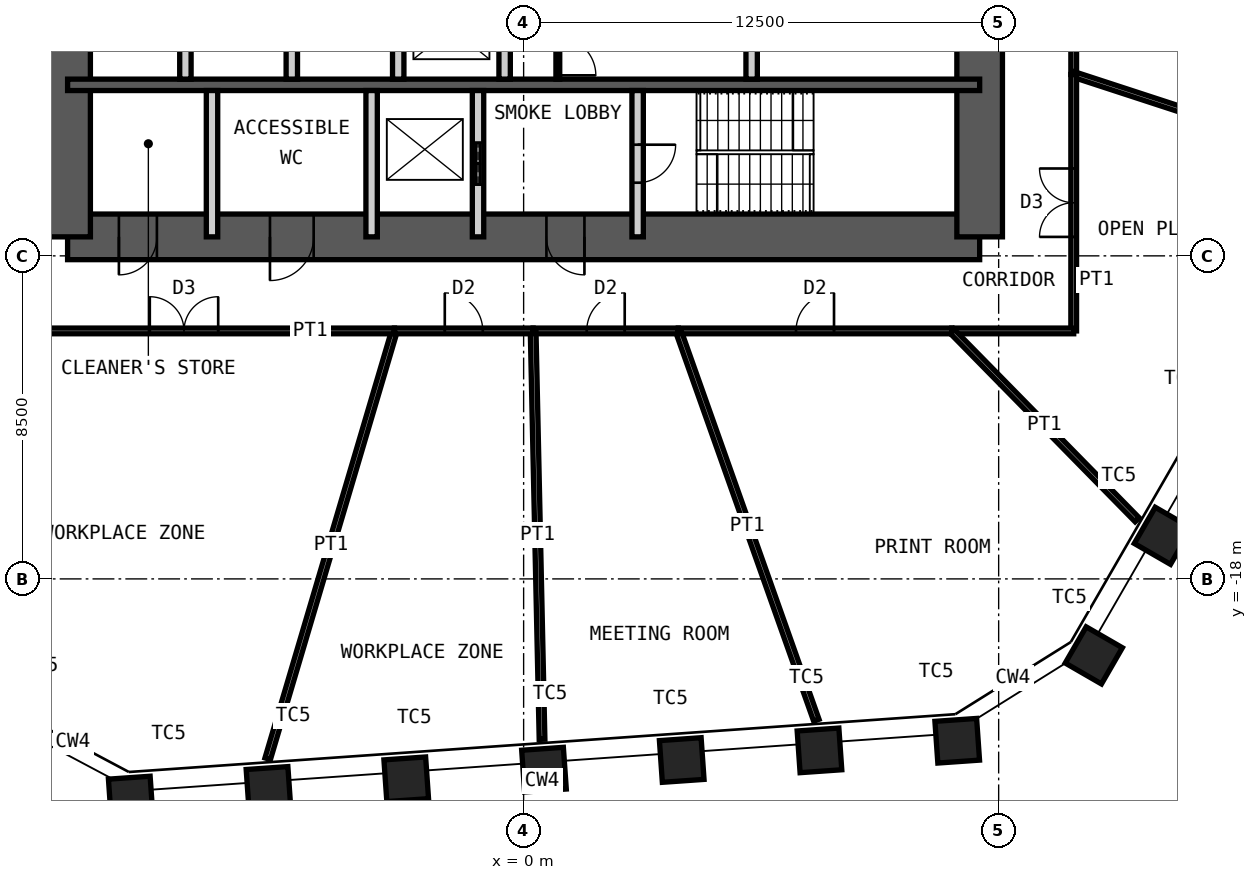
"""IFC4 building model, lengths in metres.
Left out: names, types, materials, properties, quantities, classifications, styles, units other than length and angle.
Written with IfcOpenShell. Run it as: python <this file> out.ifc"""

import sys

from ifc_helpers import new_model, si_unit, direction, frame, frame_2d, origin, origin_2d, place, context, subcontext, project, spatial, rectangle, hollow_rectangle, extrude, element, fill, save


model = new_model("IFC4")
c1 = context("Model", 3, precision=1e-05, world=origin(), true_north=direction((0.0, 1.0)))
c2 = subcontext(c1, "Body", "Model", "MODEL_VIEW")
j1 = project(units=[si_unit("LENGTHUNIT", "METRE"), si_unit("PLANEANGLEUNIT", "RADIAN")], contexts=[c1])
p1 = place(None, origin())
s1 = spatial("IfcSite", under=j1, at=p1, CompositionType="ELEMENT")
p2 = place(p1, origin())
s2 = spatial("IfcBuilding", under=s1, at=p2, CompositionType="ELEMENT")
p3 = place(p2, frame((0.0, 0.0, 209.8)))
s3 = spatial("IfcBuildingStorey", under=s2, at=p3, CompositionType="ELEMENT", Elevation=209.8)
for number, where, z_axis, x_axis in (
    (1, (16.821, -16.866, 0.0), (0.0, 0.0, 1.0), (0.5, 0.866, 0.0)),
    (2, (15.004, -20.012, 0.0), (0.0, 0.0, 1.0), (0.5, 0.866, 0.0)),
    (3, (11.41, -22.258, 0.0), (0.0, 0.0, 1.0), (0.998, 0.07, 0.0)),
    (4, (7.785, -22.512, 0.0), (0.0, 0.0, 1.0), (0.998, 0.07, 0.0)),
    (5, (4.16, -22.765, 0.0), (0.0, 0.0, 1.0), (0.998, 0.07, 0.0)),
    (6, (0.536, -23.019, 0.0), (0.0, 0.0, 1.0), (0.998, 0.07, 0.0)),
    (7, (-3.089, -23.272, 0.0), (0.0, 0.0, 1.0), (0.998, 0.07, 0.0)),
    (8, (-6.714, -23.526, 0.0), (0.0, 0.0, 1.0), (0.998, 0.07, 0.0)),
    (9, (-10.338, -23.779, 0.0), (0.0, 0.0, 1.0), (0.998, 0.07, 0.0)),
):
    element("IfcColumn", number, at=place(p3, frame(where, z_axis=z_axis, x_axis=x_axis)), inside=s3, PredefinedType="COLUMN", context=c2, shape_type="SweptSolid", body=[
        extrude(hollow_rectangle(XDim=1.1, YDim=1.1, WallThickness=0.07, at=origin_2d()), origin(), (0.0, 0.0, 1.0), 4.2),
    ])
p4 = place(p3, frame((-12.0, -9.0, 0.0), z_axis=(0.0, 0.0, 1.0), x_axis=(1.0, 0.0, 0.0)))
e10 = element("IfcWall", 10, at=p4, inside=s3, PredefinedType="SHEAR", context=c2, shape_type="SweptSolid", body=[
    extrude(rectangle(XDim=24.0, YDim=1.2, at=frame_2d((12.0, 0.0))), origin(), (0.0, 0.0, 1.0), 4.2),
])
p5 = place(p4, frame((1.35, 0.0, 0.0)))
e11 = element("IfcOpeningElement", 11, at=p5, cuts=e10, PredefinedType="OPENING", context=c2, shape_type="SweptSolid", body=[
    extrude(rectangle(XDim=1.0, YDim=2.1, at=frame_2d((0.5, 1.05))), frame((0.0, 0.61, 0.0), z_axis=(0.0, -1.0, 0.0), x_axis=(1.0, 0.0, 0.0)), (0.0, 0.0, 1.0), 1.22),
])
p6 = place(p4, frame((5.325, 0.0, 0.0)))
e12 = element("IfcOpeningElement", 12, at=p6, cuts=e10, PredefinedType="OPENING", context=c2, shape_type="SweptSolid", body=[
    extrude(rectangle(XDim=1.15, YDim=2.1, at=frame_2d((0.575, 1.05))), frame((0.0, 0.61, 0.0), z_axis=(0.0, -1.0, 0.0), x_axis=(1.0, 0.0, 0.0)), (0.0, 0.0, 1.0), 1.22),
])
p7 = place(p4, frame((12.6, 0.0, 0.0)))
e13 = element("IfcOpeningElement", 13, at=p7, cuts=e10, PredefinedType="OPENING", context=c2, shape_type="SweptSolid", body=[
    extrude(rectangle(XDim=1.0, YDim=2.1, at=frame_2d((0.5, 1.05))), frame((0.0, 0.61, 0.0), z_axis=(0.0, -1.0, 0.0), x_axis=(1.0, 0.0, 0.0)), (0.0, 0.0, 1.0), 1.22),
])
p8 = place(p3, frame((12.0, -9.0, 0.0), z_axis=(0.0, 0.0, 1.0), x_axis=(0.0, 1.0, 0.0)))
e14 = element("IfcWall", 14, at=p8, inside=s3, PredefinedType="SHEAR", context=c2, shape_type="SweptSolid", body=[
    extrude(rectangle(XDim=18.0, YDim=1.2, at=frame_2d((9.0, 0.0))), origin(), (0.0, 0.0, 1.0), 4.2),
])
p9 = place(p8, frame((8.1, 0.0, 0.0)))
e15 = element("IfcOpeningElement", 15, at=p9, cuts=e14, PredefinedType="OPENING", context=c2, shape_type="SweptSolid", body=[
    extrude(rectangle(XDim=1.8, YDim=2.1, at=frame_2d((0.9, 1.05))), frame((0.0, 0.61, 0.0), z_axis=(0.0, -1.0, 0.0), x_axis=(1.0, 0.0, 0.0)), (0.0, 0.0, 1.0), 1.22),
])
p10 = place(p3, frame((-12.0, -9.0, 0.0), z_axis=(0.0, 0.0, 1.0), x_axis=(0.0, 1.0, 0.0)))
e16 = element("IfcWall", 16, at=p10, inside=s3, PredefinedType="SHEAR", context=c2, shape_type="SweptSolid", body=[
    extrude(rectangle(XDim=18.0, YDim=1.2, at=frame_2d((9.0, 0.0))), origin(), (0.0, 0.0, 1.0), 4.2),
])
p11 = place(p10, frame((8.1, 0.0, 0.0)))
e17 = element("IfcOpeningElement", 17, at=p11, cuts=e16, PredefinedType="OPENING", context=c2, shape_type="SweptSolid", body=[
    extrude(rectangle(XDim=1.8, YDim=2.1, at=frame_2d((0.9, 1.05))), frame((0.0, 0.61, 0.0), z_axis=(0.0, -1.0, 0.0), x_axis=(1.0, 0.0, 0.0)), (0.0, 0.0, 1.0), 1.22),
])
p12 = place(p3, frame((-12.0, -5.0, 0.0), z_axis=(0.0, 0.0, 1.0), x_axis=(1.0, 0.0, 0.0)))
e18 = element("IfcWall", 18, at=p12, inside=s3, PredefinedType="SHEAR", context=c2, shape_type="SweptSolid", body=[
    extrude(rectangle(XDim=24.0, YDim=0.3, at=frame_2d((12.0, 0.0))), origin(), (0.0, 0.0, 1.0), 4.2),
])
for number, where, z_axis, x_axis in (
    (19, (-8.9, -4.85, 0.0), (0.0, 0.0, 1.0), (0.0, 1.0, 0.0)),
    (20, (-6.1, -4.85, 0.0), (0.0, 0.0, 1.0), (0.0, 1.0, 0.0)),
    (21, (-3.3, -4.85, 0.0), (0.0, 0.0, 1.0), (0.0, 1.0, 0.0)),
    (22, (-0.5, -4.85, 0.0), (0.0, 0.0, 1.0), (0.0, 1.0, 0.0)),
    (23, (6.0, -4.85, 0.0), (0.0, 0.0, 1.0), (0.0, 1.0, 0.0)),
):
    element("IfcWall", number, at=place(p3, frame(where, z_axis=z_axis, x_axis=x_axis)), inside=s3, PredefinedType="PARTITIONING", context=c2, shape_type="SweptSolid", body=[
        extrude(rectangle(XDim=2.65, YDim=0.3, at=frame_2d((1.325, 0.0))), origin(), (0.0, 0.0, 1.0), 3.98),
    ])
for number, where, z_axis, x_axis in (
    (24, (-8.2, -9.0, 0.0), (0.0, 0.0, 1.0), (0.0, 1.0, 0.0)),
    (25, (-4.0, -9.0, 0.0), (0.0, 0.0, 1.0), (0.0, 1.0, 0.0)),
):
    element("IfcWall", number, at=place(p3, frame(where, z_axis=z_axis, x_axis=x_axis)), inside=s3, PredefinedType="PARTITIONING", context=c2, shape_type="SweptSolid", body=[
        extrude(rectangle(XDim=3.85, YDim=0.3, at=frame_2d((1.925, 0.0))), origin(), (0.0, 0.0, 1.0), 3.98),
    ])
p13 = place(p3, frame((-1.2, -9.0, 0.0), z_axis=(0.0, 0.0, 1.0), x_axis=(0.0, 1.0, 0.0)))
e26 = element("IfcWall", 26, at=p13, inside=s3, PredefinedType="PARTITIONING", context=c2, shape_type="SweptSolid", body=[
    extrude(rectangle(XDim=3.85, YDim=0.3, at=frame_2d((1.925, 0.0))), origin(), (0.0, 0.0, 1.0), 3.98),
])
p14 = place(p13, frame((1.375, 0.0, 0.0)))
e27 = element("IfcOpeningElement", 27, at=p14, cuts=e26, PredefinedType="OPENING", context=c2, shape_type="SweptSolid", body=[
    extrude(rectangle(XDim=1.1, YDim=2.4, at=frame_2d((0.55, 1.2))), frame((0.0, 0.16, 0.0), z_axis=(0.0, -1.0, 0.0), x_axis=(1.0, 0.0, 0.0)), (0.0, 0.0, 1.0), 0.32),
])
p15 = place(p3, frame((3.0, -9.0, 0.0), z_axis=(0.0, 0.0, 1.0), x_axis=(0.0, 1.0, 0.0)))
e28 = element("IfcWall", 28, at=p15, inside=s3, PredefinedType="PARTITIONING", context=c2, shape_type="SweptSolid", body=[
    extrude(rectangle(XDim=3.85, YDim=0.3, at=frame_2d((1.925, 0.0))), origin(), (0.0, 0.0, 1.0), 3.98),
])
p16 = place(p15, frame((1.425, 0.0, 0.0)))
e29 = element("IfcOpeningElement", 29, at=p16, cuts=e28, PredefinedType="OPENING", context=c2, shape_type="SweptSolid", body=[
    extrude(rectangle(XDim=1.0, YDim=2.1, at=frame_2d((0.5, 1.05))), frame((0.0, 0.16, 0.0), z_axis=(0.0, -1.0, 0.0), x_axis=(1.0, 0.0, 0.0)), (0.0, 0.0, 1.0), 0.32),
])
p17 = place(p3, frame((0.9, -4.85, 0.0), z_axis=(0.0, 0.0, 1.0), x_axis=(0.0, 1.0, 0.0)))
e30 = element("IfcWall", 30, at=p17, inside=s3, PredefinedType="PARTITIONING", context=c2, shape_type="SweptSolid", body=[
    extrude(rectangle(XDim=2.65, YDim=0.1, at=frame_2d((1.325, 0.0))), origin(), (0.0, 0.0, 1.0), 3.98),
])
p18 = place(p17, frame((0.1, 0.0, 0.0)))
e31 = element("IfcOpeningElement", 31, at=p18, cuts=e30, PredefinedType="OPENING", context=c2, shape_type="SweptSolid", body=[
    extrude(rectangle(XDim=1.0, YDim=2.4, at=frame_2d((0.5, 1.2))), frame((0.0, 0.06, 0.0), z_axis=(0.0, -1.0, 0.0), x_axis=(1.0, 0.0, 0.0)), (0.0, 0.0, 1.0), 0.12),
])
p19 = place(p3, frame((-6.734, -22.731, 0.0), z_axis=(0.0, 0.0, 1.0), x_axis=(0.284049386564, 0.958809650553, 0.0)))
e32 = element("IfcWall", 32, at=p19, inside=s3, PredefinedType="PARTITIONING", context=c2, shape_type="SweptSolid", body=[
    extrude(rectangle(XDim=11.74, YDim=0.15, at=frame_2d((5.87, 0.0))), origin(), (0.0, 0.0, 1.0), 3.33),
])
p20 = place(p3, frame((-3.399, -11.475, 0.0), z_axis=(0.0, 0.0, 1.0), x_axis=(-1.0, 0.0, 0.0)))
e33 = element("IfcWall", 33, at=p20, inside=s3, PredefinedType="PARTITIONING", context=c2, shape_type="SweptSolid", body=[
    extrude(rectangle(XDim=11.076, YDim=0.15, at=frame_2d((5.538, 0.0))), origin(), (0.0, 0.0, 1.0), 4.03),
])
p21 = place(p20, frame((4.638, 0.0, 0.0)))
e34 = element("IfcOpeningElement", 34, at=p21, cuts=e33, PredefinedType="OPENING", context=c2, shape_type="SweptSolid", body=[
    extrude(rectangle(XDim=1.8, YDim=2.4, at=frame_2d((0.9, 1.2))), frame((0.0, 0.085, 0.0), z_axis=(0.0, -1.0, 0.0), x_axis=(1.0, 0.0, 0.0)), (0.0, 0.0, 1.0), 0.17),
])
p22 = place(p3, frame((14.475, -2.422, 0.0), z_axis=(0.0, 0.0, 1.0), x_axis=(0.0, -1.0, 0.0)))
e35 = element("IfcWall", 35, at=p22, inside=s3, PredefinedType="PARTITIONING", context=c2, shape_type="SweptSolid", body=[
    extrude(rectangle(XDim=2.305, YDim=0.15, at=frame_2d((1.153, 0.0))), origin(), (0.0, 0.0, 1.0), 4.03),
])
p23 = place(p22, frame((0.653, 0.0, 0.0)))
e36 = element("IfcOpeningElement", 36, at=p23, cuts=e35, PredefinedType="OPENING", context=c2, shape_type="SweptSolid", body=[
    extrude(rectangle(XDim=1.0, YDim=2.4, at=frame_2d((0.5, 1.2))), frame((0.0, 0.085, 0.0), z_axis=(0.0, -1.0, 0.0), x_axis=(1.0, 0.0, 0.0)), (0.0, 0.0, 1.0), 0.17),
])
p24 = place(p3, frame((21.57, -7.044, 0.0), z_axis=(0.0, 0.0, 1.0), x_axis=(-0.950585953502, 0.310461503258, 0.0)))
e37 = element("IfcWall", 37, at=p24, inside=s3, PredefinedType="PARTITIONING", context=c2, shape_type="SweptSolid", body=[
    extrude(rectangle(XDim=7.464, YDim=0.15, at=frame_2d((3.732, 0.0))), origin(), (0.0, 0.0, 1.0), 3.43),
])
p25 = place(p3, frame((14.475, -4.727, 0.0), z_axis=(0.0, 0.0, 1.0), x_axis=(0.0, -1.0, 0.0)))
e38 = element("IfcWall", 38, at=p25, inside=s3, PredefinedType="PARTITIONING", context=c2, shape_type="SweptSolid", body=[
    extrude(rectangle(XDim=6.748, YDim=0.15, at=frame_2d((3.374, 0.0))), origin(), (0.0, 0.0, 1.0), 4.03),
])
p26 = place(p25, frame((2.474, 0.0, 0.0)))
e39 = element("IfcOpeningElement", 39, at=p26, cuts=e38, PredefinedType="OPENING", context=c2, shape_type="SweptSolid", body=[
    extrude(rectangle(XDim=1.8, YDim=2.4, at=frame_2d((0.9, 1.2))), frame((0.0, 0.085, 0.0), z_axis=(0.0, -1.0, 0.0), x_axis=(1.0, 0.0, 0.0)), (0.0, 0.0, 1.0), 0.17),
])
p27 = place(p3, frame((14.475, -11.475, 0.0), z_axis=(0.0, 0.0, 1.0), x_axis=(-1.0, 0.0, 0.0)))
e40 = element("IfcWall", 40, at=p27, inside=s3, PredefinedType="PARTITIONING", context=c2, shape_type="SweptSolid", body=[
    extrude(rectangle(XDim=3.209, YDim=0.15, at=frame_2d((1.605, 0.0))), origin(), (0.0, 0.0, 1.0), 4.03),
])
p28 = place(p3, frame((16.145, -16.444, 0.0), z_axis=(0.0, 0.0, 1.0), x_axis=(-0.700591378209, 0.71356269576, 0.0)))
e41 = element("IfcWall", 41, at=p28, inside=s3, PredefinedType="PARTITIONING", context=c2, shape_type="SweptSolid", body=[
    extrude(rectangle(XDim=6.964, YDim=0.15, at=frame_2d((3.482, 0.0))), origin(), (0.0, 0.0, 1.0), 3.43),
])
p29 = place(p3, frame((11.266, -11.475, 0.0), z_axis=(0.0, 0.0, 1.0), x_axis=(-1.0, 0.0, 0.0)))
e42 = element("IfcWall", 42, at=p29, inside=s3, PredefinedType="PARTITIONING", context=c2, shape_type="SweptSolid", body=[
    extrude(rectangle(XDim=7.196, YDim=0.15, at=frame_2d((3.598, 0.0))), origin(), (0.0, 0.0, 1.0), 4.03),
])
p30 = place(p29, frame((3.098, 0.0, 0.0)))
e43 = element("IfcOpeningElement", 43, at=p30, cuts=e42, PredefinedType="OPENING", context=c2, shape_type="SweptSolid", body=[
    extrude(rectangle(XDim=1.0, YDim=2.4, at=frame_2d((0.5, 1.2))), frame((0.0, 0.085, 0.0), z_axis=(0.0, -1.0, 0.0), x_axis=(1.0, 0.0, 0.0)), (0.0, 0.0, 1.0), 0.17),
])
p31 = place(p3, frame((7.703, -21.719, 0.0), z_axis=(0.0, 0.0, 1.0), x_axis=(-0.334269551553, 0.942477515331, 0.0)))
e44 = element("IfcWall", 44, at=p31, inside=s3, PredefinedType="PARTITIONING", context=c2, shape_type="SweptSolid", body=[
    extrude(rectangle(XDim=10.869, YDim=0.15, at=frame_2d((5.435, 0.0))), origin(), (0.0, 0.0, 1.0), 3.43),
])
p32 = place(p3, frame((4.07, -11.475, 0.0), z_axis=(0.0, 0.0, 1.0), x_axis=(-1.0, 0.0, 0.0)))
e45 = element("IfcWall", 45, at=p32, inside=s3, PredefinedType="PARTITIONING", context=c2, shape_type="SweptSolid", body=[
    extrude(rectangle(XDim=3.819, YDim=0.15, at=frame_2d((1.91, 0.0))), origin(), (0.0, 0.0, 1.0), 4.03),
])
p33 = place(p32, frame((1.41, 0.0, 0.0)))
e46 = element("IfcOpeningElement", 46, at=p33, cuts=e45, PredefinedType="OPENING", context=c2, shape_type="SweptSolid", body=[
    extrude(rectangle(XDim=1.0, YDim=2.4, at=frame_2d((0.5, 1.2))), frame((0.0, 0.085, 0.0), z_axis=(0.0, -1.0, 0.0), x_axis=(1.0, 0.0, 0.0)), (0.0, 0.0, 1.0), 0.17),
])
p34 = place(p3, frame((0.485, -22.22, 0.0), z_axis=(0.0, 0.0, 1.0), x_axis=(-0.021806550804, 0.999762208899, 0.0)))
e47 = element("IfcWall", 47, at=p34, inside=s3, PredefinedType="PARTITIONING", context=c2, shape_type="SweptSolid", body=[
    extrude(rectangle(XDim=10.748, YDim=0.15, at=frame_2d((5.374, 0.0))), origin(), (0.0, 0.0, 1.0), 3.43),
])
p35 = place(p3, frame((0.25, -11.475, 0.0), z_axis=(0.0, 0.0, 1.0), x_axis=(-1.0, 0.0, 0.0)))
e48 = element("IfcWall", 48, at=p35, inside=s3, PredefinedType="PARTITIONING", context=c2, shape_type="SweptSolid", body=[
    extrude(rectangle(XDim=3.65, YDim=0.15, at=frame_2d((1.825, 0.0))), origin(), (0.0, 0.0, 1.0), 4.03),
])
p36 = place(p35, frame((1.325, 0.0, 0.0)))
e49 = element("IfcOpeningElement", 49, at=p36, cuts=e48, PredefinedType="OPENING", context=c2, shape_type="SweptSolid", body=[
    extrude(rectangle(XDim=1.0, YDim=2.4, at=frame_2d((0.5, 1.2))), frame((0.0, 0.085, 0.0), z_axis=(0.0, -1.0, 0.0), x_axis=(1.0, 0.0, 0.0)), (0.0, 0.0, 1.0), 0.17),
])
p37 = place(p5, origin())
e50 = element("IfcDoor", 50, at=p37, inside=s3, OperationType="SINGLE_SWING_LEFT", PredefinedType="DOOR", context=c2, shape_type="SweptSolid", body=[
    extrude(rectangle(XDim=1.0, YDim=2.1, at=frame_2d((0.5, 1.05))), frame((0.0, 0.025, 0.0), z_axis=(0.0, -1.0, 0.0), x_axis=(1.0, 0.0, 0.0)), (0.0, 0.0, 1.0), 0.05),
])
fill(e11, e50)
p38 = place(p6, origin())
e51 = element("IfcDoor", 51, at=p38, inside=s3, OperationType="SINGLE_SWING_LEFT", PredefinedType="DOOR", context=c2, shape_type="SweptSolid", body=[
    extrude(rectangle(XDim=1.15, YDim=2.1, at=frame_2d((0.575, 1.05))), frame((0.0, 0.025, 0.0), z_axis=(0.0, -1.0, 0.0), x_axis=(1.0, 0.0, 0.0)), (0.0, 0.0, 1.0), 0.05),
])
fill(e12, e51)
p39 = place(p7, origin())
e52 = element("IfcDoor", 52, at=p39, inside=s3, OperationType="SINGLE_SWING_RIGHT", PredefinedType="DOOR", context=c2, shape_type="SweptSolid", body=[
    extrude(rectangle(XDim=1.0, YDim=2.1, at=frame_2d((0.5, 1.05))), frame((0.0, 0.025, 0.0), z_axis=(0.0, -1.0, 0.0), x_axis=(1.0, 0.0, 0.0)), (0.0, 0.0, 1.0), 0.05),
])
fill(e13, e52)
p40 = place(p16, origin())
e53 = element("IfcDoor", 53, at=p40, inside=s3, OperationType="SINGLE_SWING_RIGHT", PredefinedType="DOOR", context=c2, shape_type="SweptSolid", body=[
    extrude(rectangle(XDim=1.0, YDim=2.1, at=frame_2d((0.5, 1.05))), frame((0.0, 0.025, 0.0), z_axis=(0.0, -1.0, 0.0), x_axis=(1.0, 0.0, 0.0)), (0.0, 0.0, 1.0), 0.05),
])
fill(e29, e53)
p41 = place(p14, origin())
e54 = element("IfcDoor", 54, at=p41, inside=s3, OperationType="DOUBLE_DOOR_SLIDING", PredefinedType="DOOR", context=c2, shape_type="SweptSolid", body=[
    extrude(rectangle(XDim=1.1, YDim=2.4, at=frame_2d((0.55, 1.2))), frame((0.0, 0.025, 0.0), z_axis=(0.0, -1.0, 0.0), x_axis=(1.0, 0.0, 0.0)), (0.0, 0.0, 1.0), 0.05),
])
fill(e27, e54)
p42 = place(p18, origin())
e55 = element("IfcDoor", 55, at=p42, inside=s3, OperationType="SINGLE_SWING_LEFT", PredefinedType="DOOR", context=c2, shape_type="SweptSolid", body=[
    extrude(rectangle(XDim=1.0, YDim=2.4, at=frame_2d((0.5, 1.2))), frame((0.0, 0.025, 0.0), z_axis=(0.0, -1.0, 0.0), x_axis=(1.0, 0.0, 0.0)), (0.0, 0.0, 1.0), 0.05),
])
fill(e31, e55)
p43 = place(p21, origin())
e56 = element("IfcDoor", 56, at=p43, inside=s3, OperationType="DOUBLE_DOOR_DOUBLE_SWING", PredefinedType="DOOR", context=c2, shape_type="SweptSolid", body=[
    extrude(rectangle(XDim=1.8, YDim=2.4, at=frame_2d((0.9, 1.2))), frame((0.0, 0.025, 0.0), z_axis=(0.0, -1.0, 0.0), x_axis=(1.0, 0.0, 0.0)), (0.0, 0.0, 1.0), 0.05),
])
fill(e34, e56)
p44 = place(p26, origin())
e57 = element("IfcDoor", 57, at=p44, inside=s3, OperationType="DOUBLE_DOOR_DOUBLE_SWING", PredefinedType="DOOR", context=c2, shape_type="SweptSolid", body=[
    extrude(rectangle(XDim=1.8, YDim=2.4, at=frame_2d((0.9, 1.2))), frame((0.0, 0.025, 0.0), z_axis=(0.0, -1.0, 0.0), x_axis=(1.0, 0.0, 0.0)), (0.0, 0.0, 1.0), 0.05),
])
fill(e39, e57)
p45 = place(p30, origin())
e58 = element("IfcDoor", 58, at=p45, inside=s3, OperationType="SINGLE_SWING_LEFT", PredefinedType="DOOR", context=c2, shape_type="SweptSolid", body=[
    extrude(rectangle(XDim=1.0, YDim=2.4, at=frame_2d((0.5, 1.2))), frame((0.0, 0.025, 0.0), z_axis=(0.0, -1.0, 0.0), x_axis=(1.0, 0.0, 0.0)), (0.0, 0.0, 1.0), 0.05),
])
fill(e43, e58)
p46 = place(p33, origin())
e59 = element("IfcDoor", 59, at=p46, inside=s3, OperationType="SINGLE_SWING_LEFT", PredefinedType="DOOR", context=c2, shape_type="SweptSolid", body=[
    extrude(rectangle(XDim=1.0, YDim=2.4, at=frame_2d((0.5, 1.2))), frame((0.0, 0.025, 0.0), z_axis=(0.0, -1.0, 0.0), x_axis=(1.0, 0.0, 0.0)), (0.0, 0.0, 1.0), 0.05),
])
fill(e46, e59)
p47 = place(p36, origin())
e60 = element("IfcDoor", 60, at=p47, inside=s3, OperationType="SINGLE_SWING_RIGHT", PredefinedType="DOOR", context=c2, shape_type="SweptSolid", body=[
    extrude(rectangle(XDim=1.0, YDim=2.4, at=frame_2d((0.5, 1.2))), frame((0.0, 0.025, 0.0), z_axis=(0.0, -1.0, 0.0), x_axis=(1.0, 0.0, 0.0)), (0.0, 0.0, 1.0), 0.05),
])
fill(e49, e60)
save(model, sys.argv[1])
